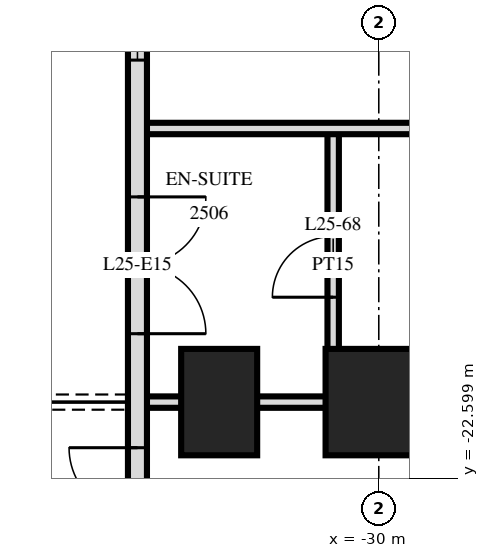
"""IFC4 building model, lengths in metres.
Left out: names, types, materials, properties, quantities, classifications, styles, units other than length and angle.
Written with IfcOpenShell. Run it as: python <this file> out.ifc"""

import sys

from ifc_helpers import new_model, si_unit, direction, frame, frame_2d, origin, origin_2d, place, context, subcontext, project, spatial, rectangle, extrude, element, fill, save


model = new_model("IFC4")
c1 = context("Model", 3, precision=1e-05, world=origin(), true_north=direction((0.0, 1.0)))
c2 = subcontext(c1, "Body", "Model", "MODEL_VIEW")
j1 = project(units=[si_unit("LENGTHUNIT", "METRE"), si_unit("PLANEANGLEUNIT", "RADIAN")], contexts=[c1])
p1 = place(None, origin())
s1 = spatial("IfcSite", under=j1, at=p1, CompositionType="ELEMENT")
p2 = place(p1, origin())
s2 = spatial("IfcBuilding", under=s1, at=p2, CompositionType="ELEMENT")
p3 = place(p2, frame((0.0, 0.0, 99.6)))
s3 = spatial("IfcBuildingStorey", under=s2, at=p3, CompositionType="ELEMENT", Elevation=99.6)
p4 = place(p3, frame((-32.1, -21.6, 0.0), z_axis=(0.0, 0.0, 1.0), x_axis=(0.0, 1.0, 0.0)))
e1 = element("IfcColumn", 1, at=p4, inside=s3, PredefinedType="COLUMN", context=c2, shape_type="SweptSolid", body=[
    extrude(rectangle(XDim=1.4, YDim=1.0, at=origin_2d()), origin(), (0.0, 0.0, 1.0), 3.6),
])
p5 = place(p3, frame((-30.0, -21.6, 0.0), z_axis=(0.0, 0.0, 1.0), x_axis=(1.0, 0.0, 0.0)))
e2 = element("IfcColumn", 2, at=p5, inside=s3, PredefinedType="COLUMN", context=c2, shape_type="SweptSolid", body=[
    extrude(rectangle(XDim=1.4, YDim=1.4, at=origin_2d()), origin(), (0.0, 0.0, 1.0), 3.6),
])
p6 = place(p3, frame((-33.175, -3.325, 0.0), z_axis=(0.0, 0.0, 1.0), x_axis=(0.0, -1.0, 0.0)))
e3 = element("IfcWall", 3, at=p6, inside=s3, PredefinedType="SOLIDWALL", context=c2, shape_type="SweptSolid", body=[
    extrude(rectangle(XDim=21.551, YDim=0.25, at=frame_2d((10.775, 0.0))), origin(), (0.0, 0.0, 1.0), 3.32),
])
p7 = place(p6, frame((6.575, 0.0, 0.0)))
e4 = element("IfcOpeningElement", 4, at=p7, cuts=e3, PredefinedType="OPENING", context=c2, shape_type="SweptSolid", body=[
    extrude(rectangle(XDim=1.8, YDim=2.4, at=frame_2d((0.9, 1.2))), frame((0.0, 0.135, 0.0), z_axis=(0.0, -1.0, 0.0), x_axis=(1.0, 0.0, 0.0)), (0.0, 0.0, 1.0), 0.27),
])
p8 = place(p6, frame((9.425, 0.0, 0.3)))
e5 = element("IfcOpeningElement", 5, at=p8, cuts=e3, PredefinedType="OPENING", context=c2, shape_type="SweptSolid", body=[
    extrude(rectangle(XDim=1.8, YDim=2.1, at=frame_2d((0.9, 1.05))), frame((0.0, 0.135, 0.0), z_axis=(0.0, -1.0, 0.0), x_axis=(1.0, 0.0, 0.0)), (0.0, 0.0, 1.0), 0.27),
])
p9 = place(p6, frame((12.575, 0.0, 0.3)))
e6 = element("IfcOpeningElement", 6, at=p9, cuts=e3, PredefinedType="OPENING", context=c2, shape_type="SweptSolid", body=[
    extrude(rectangle(XDim=1.2, YDim=2.1, at=frame_2d((0.6, 1.05))), frame((0.0, 0.135, 0.0), z_axis=(0.0, -1.0, 0.0), x_axis=(1.0, 0.0, 0.0)), (0.0, 0.0, 1.0), 0.27),
])
p10 = place(p6, frame((15.575, 0.0, 0.0)))
e7 = element("IfcOpeningElement", 7, at=p10, cuts=e3, PredefinedType="OPENING", context=c2, shape_type="SweptSolid", body=[
    extrude(rectangle(XDim=1.8, YDim=2.4, at=frame_2d((0.9, 1.2))), frame((0.0, 0.135, 0.0), z_axis=(0.0, -1.0, 0.0), x_axis=(1.0, 0.0, 0.0)), (0.0, 0.0, 1.0), 0.27),
])
p11 = place(p6, frame((18.875, 0.0, 0.0)))
e8 = element("IfcOpeningElement", 8, at=p11, cuts=e3, PredefinedType="OPENING", context=c2, shape_type="SweptSolid", body=[
    extrude(rectangle(XDim=1.8, YDim=2.4, at=frame_2d((0.9, 1.2))), frame((0.0, 0.135, 0.0), z_axis=(0.0, -1.0, 0.0), x_axis=(1.0, 0.0, 0.0)), (0.0, 0.0, 1.0), 0.27),
])
p12 = place(p3, frame((-30.6, -21.6, 0.0), z_axis=(0.0, 0.0, 1.0), x_axis=(0.0, 1.0, 0.0)))
e9 = element("IfcWall", 9, at=p12, inside=s3, PredefinedType="PARTITIONING", context=c2, shape_type="SweptSolid", body=[
    extrude(rectangle(XDim=3.6, YDim=0.15, at=frame_2d((1.8, 0.0))), origin(), (0.0, 0.0, 1.0), 3.32),
])
p13 = place(p12, frame((1.38, 0.0, 0.0)))
e10 = element("IfcOpeningElement", 10, at=p13, cuts=e9, PredefinedType="OPENING", context=c2, shape_type="SweptSolid", body=[
    extrude(rectangle(XDim=0.8, YDim=2.1, at=frame_2d((0.4, 1.05))), frame((0.0, 0.085, 0.0), z_axis=(0.0, -1.0, 0.0), x_axis=(1.0, 0.0, 0.0)), (0.0, 0.0, 1.0), 0.17),
])
p14 = place(p3, frame((-33.12, -21.6, 0.0), z_axis=(0.0, 0.0, 1.0), x_axis=(1.0, 0.0, 0.0)))
e11 = element("IfcWall", 11, at=p14, inside=s3, PredefinedType="PARTITIONING", context=c2, shape_type="SweptSolid", body=[
    extrude(rectangle(XDim=2.52, YDim=0.15, at=frame_2d((1.26, 0.0))), origin(), (0.0, 0.0, 1.0), 3.32),
])
p15 = place(p3, frame((-33.12, -18.0, 0.0), z_axis=(0.0, 0.0, 1.0), x_axis=(1.0, 0.0, 0.0)))
e12 = element("IfcWall", 12, at=p15, inside=s3, PredefinedType="PARTITIONING", context=c2, shape_type="SweptSolid", body=[
    extrude(rectangle(XDim=66.24, YDim=0.15, at=frame_2d((33.12, 0.0))), origin(), (0.0, 0.0, 1.0), 3.32),
])
p16 = place(p15, frame((14.02, 0.0, 0.0)))
e13 = element("IfcOpeningElement", 13, at=p16, cuts=e12, PredefinedType="OPENING", context=c2, shape_type="SweptSolid", body=[
    extrude(rectangle(XDim=1.0, YDim=2.1, at=frame_2d((0.5, 1.05))), frame((0.0, 0.085, 0.0), z_axis=(0.0, -1.0, 0.0), x_axis=(1.0, 0.0, 0.0)), (0.0, 0.0, 1.0), 0.17),
])
p17 = place(p15, frame((18.82, 0.0, 0.0)))
e14 = element("IfcOpeningElement", 14, at=p17, cuts=e12, PredefinedType="OPENING", context=c2, shape_type="SweptSolid", body=[
    extrude(rectangle(XDim=1.0, YDim=2.1, at=frame_2d((0.5, 1.05))), frame((0.0, 0.085, 0.0), z_axis=(0.0, -1.0, 0.0), x_axis=(1.0, 0.0, 0.0)), (0.0, 0.0, 1.0), 0.17),
])
p18 = place(p15, frame((30.27, 0.0, 0.0)))
e15 = element("IfcOpeningElement", 15, at=p18, cuts=e12, PredefinedType="OPENING", context=c2, shape_type="SweptSolid", body=[
    extrude(rectangle(XDim=1.0, YDim=2.1, at=frame_2d((0.5, 1.05))), frame((0.0, 0.085, 0.0), z_axis=(0.0, -1.0, 0.0), x_axis=(1.0, 0.0, 0.0)), (0.0, 0.0, 1.0), 0.17),
])
p19 = place(p15, frame((33.82, 0.0, 0.0)))
e16 = element("IfcOpeningElement", 16, at=p19, cuts=e12, PredefinedType="OPENING", context=c2, shape_type="SweptSolid", body=[
    extrude(rectangle(XDim=1.0, YDim=2.1, at=frame_2d((0.5, 1.05))), frame((0.0, 0.085, 0.0), z_axis=(0.0, -1.0, 0.0), x_axis=(1.0, 0.0, 0.0)), (0.0, 0.0, 1.0), 0.17),
])
p20 = place(p15, frame((46.27, 0.0, 0.0)))
e17 = element("IfcOpeningElement", 17, at=p20, cuts=e12, PredefinedType="OPENING", context=c2, shape_type="SweptSolid", body=[
    extrude(rectangle(XDim=1.0, YDim=2.1, at=frame_2d((0.5, 1.05))), frame((0.0, 0.085, 0.0), z_axis=(0.0, -1.0, 0.0), x_axis=(1.0, 0.0, 0.0)), (0.0, 0.0, 1.0), 0.17),
])
p21 = place(p15, frame((6.07, 0.0, 0.0)))
e18 = element("IfcOpeningElement", 18, at=p21, cuts=e12, PredefinedType="OPENING", context=c2, shape_type="SweptSolid", body=[
    extrude(rectangle(XDim=1.0, YDim=2.1, at=frame_2d((0.5, 1.05))), frame((0.0, 0.085, 0.0), z_axis=(0.0, -1.0, 0.0), x_axis=(1.0, 0.0, 0.0)), (0.0, 0.0, 1.0), 0.17),
])
p22 = place(p15, frame((60.37, 0.0, 0.0)))
e19 = element("IfcOpeningElement", 19, at=p22, cuts=e12, PredefinedType="OPENING", context=c2, shape_type="SweptSolid", body=[
    extrude(rectangle(XDim=1.0, YDim=2.1, at=frame_2d((0.5, 1.05))), frame((0.0, 0.085, 0.0), z_axis=(0.0, -1.0, 0.0), x_axis=(1.0, 0.0, 0.0)), (0.0, 0.0, 1.0), 0.17),
])
p23 = place(p9, origin())
e20 = element("IfcWindow", 20, at=p23, inside=s3, PartitioningType="SINGLE_PANEL", PredefinedType="WINDOW", context=c2, shape_type="SweptSolid", body=[
    extrude(rectangle(XDim=1.2, YDim=2.1, at=frame_2d((0.6, 1.05))), frame((0.0, 0.03, 0.0), z_axis=(0.0, -1.0, 0.0), x_axis=(1.0, 0.0, 0.0)), (0.0, 0.0, 1.0), 0.06),
])
fill(e6, e20)
p24 = place(p10, origin())
e21 = element("IfcDoor", 21, at=p24, inside=s3, OperationType="DOUBLE_DOOR_SINGLE_SWING", PredefinedType="DOOR", context=c2, shape_type="SweptSolid", body=[
    extrude(rectangle(XDim=1.8, YDim=2.4, at=frame_2d((0.9, 1.2))), frame((0.0, 0.025, 0.0), z_axis=(0.0, -1.0, 0.0), x_axis=(1.0, 0.0, 0.0)), (0.0, 0.0, 1.0), 0.05),
])
fill(e7, e21)
p25 = place(p11, frame((0.9, 0.0, 0.0), z_axis=(0.0, 0.0, 1.0), x_axis=(-1.0, 0.0, 0.0)))
e22 = element("IfcDoor", 22, at=p25, inside=s3, OperationType="DOUBLE_DOOR_SINGLE_SWING", PredefinedType="DOOR", context=c2, shape_type="SweptSolid", body=[
    extrude(rectangle(XDim=1.8, YDim=2.4, at=frame_2d((0.0, 1.2))), frame((0.0, -0.025, 0.0), z_axis=(0.0, 1.0, 0.0), x_axis=(-1.0, 0.0, 0.0)), (0.0, 0.0, 1.0), 0.05),
])
fill(e8, e22)
p26 = place(p13, origin())
e23 = element("IfcDoor", 23, at=p26, inside=s3, OperationType="SINGLE_SWING_RIGHT", PredefinedType="DOOR", context=c2, shape_type="SweptSolid", body=[
    extrude(rectangle(XDim=0.8, YDim=2.1, at=frame_2d((0.4, 1.05))), frame((0.0, 0.025, 0.0), z_axis=(0.0, -1.0, 0.0), x_axis=(1.0, 0.0, 0.0)), (0.0, 0.0, 1.0), 0.05),
])
fill(e10, e23)
save(model, sys.argv[1])
